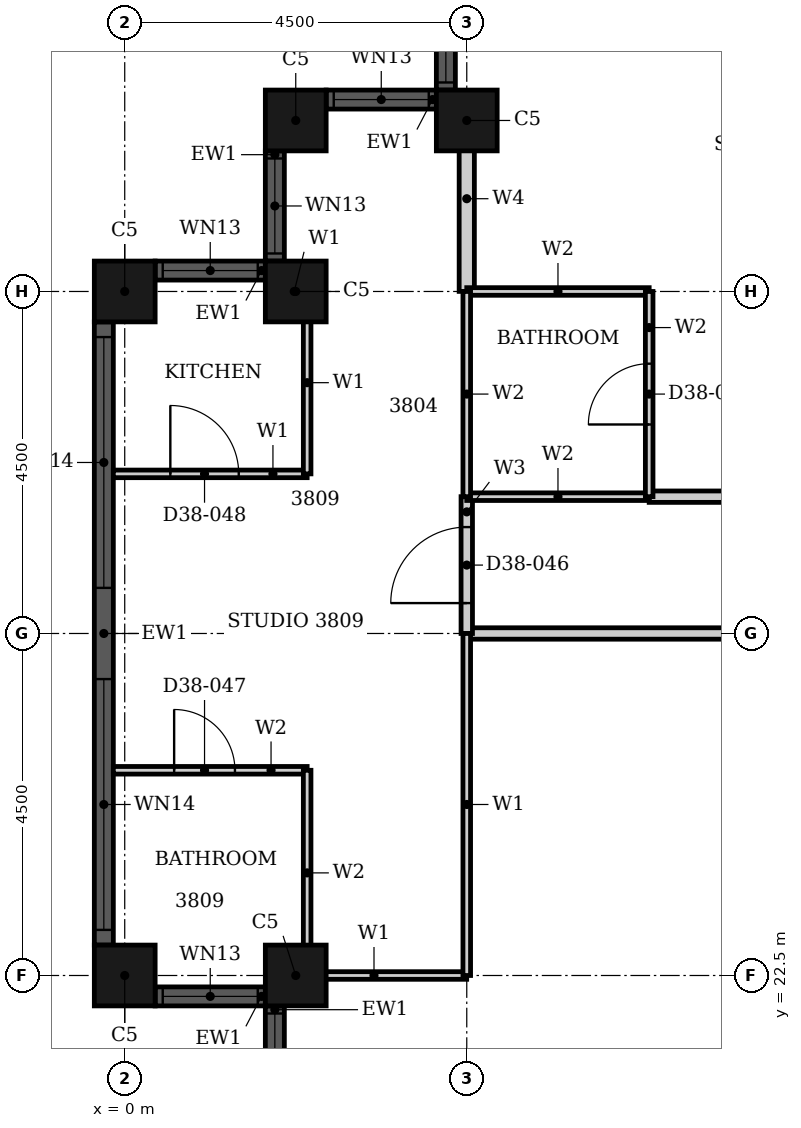
"""IFC4 building model, lengths in metres.
Left out: names, types, materials, properties, quantities, classifications, styles, units other than length and angle.
Written with IfcOpenShell. Run it as: python <this file> out.ifc"""

import sys

from ifc_helpers import new_model, si_unit, direction, frame, frame_2d, origin, origin_2d, place, context, subcontext, project, spatial, rectangle, hollow_rectangle, extrude, element, fill, save


model = new_model("IFC4")
c1 = context("Model", 3, precision=1e-05, world=origin(), true_north=direction((0.0, 1.0)))
c2 = subcontext(c1, "Body", "Model", "MODEL_VIEW")
j1 = project(units=[si_unit("LENGTHUNIT", "METRE"), si_unit("PLANEANGLEUNIT", "RADIAN")], contexts=[c1])
p1 = place(None, origin())
s1 = spatial("IfcSite", under=j1, at=p1, CompositionType="ELEMENT")
p2 = place(p1, origin())
s2 = spatial("IfcBuilding", under=s1, at=p2, CompositionType="ELEMENT")
p3 = place(p2, frame((0.0, 0.0, 154.3)))
s3 = spatial("IfcBuildingStorey", under=s2, at=p3, CompositionType="ELEMENT", Elevation=154.3)
for number, where, z_axis, x_axis in (
    (1, (4.5, 33.75, 0.0), (0.0, 0.0, 1.0), (1.0, 0.0, 0.0)),
    (2, (2.25, 33.75, 0.0), (0.0, 0.0, 1.0), (1.0, 0.0, 0.0)),
    (3, (2.25, 31.5, 0.0), (0.0, 0.0, 1.0), (1.0, 0.0, 0.0)),
    (4, (0.0, 31.5, 0.0), (0.0, 0.0, 1.0), (1.0, 0.0, 0.0)),
    (5, (0.0, 22.5, 0.0), (0.0, 0.0, 1.0), (1.0, 0.0, 0.0)),
    (6, (2.25, 22.5, 0.0), (0.0, 0.0, 1.0), (1.0, 0.0, 0.0)),
):
    element("IfcColumn", number, at=place(p3, frame(where, z_axis=z_axis, x_axis=x_axis)), inside=s3, PredefinedType="COLUMN", context=c2, shape_type="SweptSolid", body=[
        extrude(hollow_rectangle(XDim=0.8, YDim=0.8, WallThickness=0.025, at=origin_2d()), origin(), (0.0, 0.0, 1.0), 3.7),
    ])
p4 = place(p3, frame((4.225, 35.6, 0.0), z_axis=(0.0, 0.0, 1.0), x_axis=(0.0, -1.0, 0.0)))
e7 = element("IfcWall", 7, at=p4, inside=s3, PredefinedType="SOLIDWALL", context=c2, shape_type="SweptSolid", body=[
    extrude(rectangle(XDim=1.45, YDim=0.25, at=frame_2d((0.725, 0.0))), origin(), (0.0, 0.0, 1.0), 3.7),
])
p5 = place(p4, frame((0.1, 0.0, 0.9)))
e8 = element("IfcOpeningElement", 8, at=p5, cuts=e7, PredefinedType="OPENING", context=c2, shape_type="SweptSolid", body=[
    extrude(rectangle(XDim=1.25, YDim=2.08, at=frame_2d((0.625, 1.04))), frame((0.0, 0.135, 0.0), z_axis=(0.0, -1.0, 0.0), x_axis=(1.0, 0.0, 0.0)), (0.0, 0.0, 1.0), 0.27),
])
p6 = place(p3, frame((4.1, 34.025, 0.0), z_axis=(0.0, 0.0, 1.0), x_axis=(-1.0, 0.0, 0.0)))
e9 = element("IfcWall", 9, at=p6, inside=s3, PredefinedType="SOLIDWALL", context=c2, shape_type="SweptSolid", body=[
    extrude(rectangle(XDim=1.45, YDim=0.25, at=frame_2d((0.725, 0.0))), origin(), (0.0, 0.0, 1.0), 3.7),
])
p7 = place(p6, frame((0.1, 0.0, 0.9)))
e10 = element("IfcOpeningElement", 10, at=p7, cuts=e9, PredefinedType="OPENING", context=c2, shape_type="SweptSolid", body=[
    extrude(rectangle(XDim=1.25, YDim=1.85, at=frame_2d((0.625, 0.925))), frame((0.0, 0.135, 0.0), z_axis=(0.0, -1.0, 0.0), x_axis=(1.0, 0.0, 0.0)), (0.0, 0.0, 1.0), 0.27),
])
p8 = place(p3, frame((1.975, 33.35, 0.0), z_axis=(0.0, 0.0, 1.0), x_axis=(0.0, -1.0, 0.0)))
e11 = element("IfcWall", 11, at=p8, inside=s3, PredefinedType="SOLIDWALL", context=c2, shape_type="SweptSolid", body=[
    extrude(rectangle(XDim=1.45, YDim=0.25, at=frame_2d((0.725, 0.0))), origin(), (0.0, 0.0, 1.0), 3.7),
])
p9 = place(p8, frame((0.1, 0.0, 0.9)))
e12 = element("IfcOpeningElement", 12, at=p9, cuts=e11, PredefinedType="OPENING", context=c2, shape_type="SweptSolid", body=[
    extrude(rectangle(XDim=1.25, YDim=1.85, at=frame_2d((0.625, 0.925))), frame((0.0, 0.135, 0.0), z_axis=(0.0, -1.0, 0.0), x_axis=(1.0, 0.0, 0.0)), (0.0, 0.0, 1.0), 0.27),
])
p10 = place(p3, frame((1.85, 31.775, 0.0), z_axis=(0.0, 0.0, 1.0), x_axis=(-1.0, 0.0, 0.0)))
e13 = element("IfcWall", 13, at=p10, inside=s3, PredefinedType="SOLIDWALL", context=c2, shape_type="SweptSolid", body=[
    extrude(rectangle(XDim=1.45, YDim=0.25, at=frame_2d((0.725, 0.0))), origin(), (0.0, 0.0, 1.0), 3.7),
])
p11 = place(p10, frame((0.1, 0.0, 0.9)))
e14 = element("IfcOpeningElement", 14, at=p11, cuts=e13, PredefinedType="OPENING", context=c2, shape_type="SweptSolid", body=[
    extrude(rectangle(XDim=1.25, YDim=1.85, at=frame_2d((0.625, 0.925))), frame((0.0, 0.135, 0.0), z_axis=(0.0, -1.0, 0.0), x_axis=(1.0, 0.0, 0.0)), (0.0, 0.0, 1.0), 0.27),
])
p12 = place(p3, frame((-0.275, 31.1, 0.0), z_axis=(0.0, 0.0, 1.0), x_axis=(0.0, -1.0, 0.0)))
e15 = element("IfcWall", 15, at=p12, inside=s3, PredefinedType="SOLIDWALL", context=c2, shape_type="SweptSolid", body=[
    extrude(rectangle(XDim=8.2, YDim=0.25, at=frame_2d((4.1, 0.0))), origin(), (0.0, 0.0, 1.0), 3.7),
])
p13 = place(p12, frame((0.2, 0.0, 0.45)))
e16 = element("IfcOpeningElement", 16, at=p13, cuts=e15, PredefinedType="OPENING", context=c2, shape_type="SweptSolid", body=[
    extrude(rectangle(XDim=3.3, YDim=2.53, at=frame_2d((1.65, 1.265))), frame((0.0, 0.135, 0.0), z_axis=(0.0, -1.0, 0.0), x_axis=(1.0, 0.0, 0.0)), (0.0, 0.0, 1.0), 0.27),
])
p14 = place(p12, frame((4.7, 0.0, 0.45)))
e17 = element("IfcOpeningElement", 17, at=p14, cuts=e15, PredefinedType="OPENING", context=c2, shape_type="SweptSolid", body=[
    extrude(rectangle(XDim=3.3, YDim=2.53, at=frame_2d((1.65, 1.265))), frame((0.0, 0.135, 0.0), z_axis=(0.0, -1.0, 0.0), x_axis=(1.0, 0.0, 0.0)), (0.0, 0.0, 1.0), 0.27),
])
p15 = place(p3, frame((0.4, 22.225, 0.0), z_axis=(0.0, 0.0, 1.0), x_axis=(1.0, 0.0, 0.0)))
e18 = element("IfcWall", 18, at=p15, inside=s3, PredefinedType="SOLIDWALL", context=c2, shape_type="SweptSolid", body=[
    extrude(rectangle(XDim=1.45, YDim=0.25, at=frame_2d((0.725, 0.0))), origin(), (0.0, 0.0, 1.0), 3.7),
])
p16 = place(p15, frame((0.1, 0.0, 0.9)))
e19 = element("IfcOpeningElement", 19, at=p16, cuts=e18, PredefinedType="OPENING", context=c2, shape_type="SweptSolid", body=[
    extrude(rectangle(XDim=1.25, YDim=1.85, at=frame_2d((0.625, 0.925))), frame((0.0, 0.135, 0.0), z_axis=(0.0, -1.0, 0.0), x_axis=(1.0, 0.0, 0.0)), (0.0, 0.0, 1.0), 0.27),
])
p17 = place(p3, frame((1.975, 22.1, 0.0), z_axis=(0.0, 0.0, 1.0), x_axis=(0.0, -1.0, 0.0)))
e20 = element("IfcWall", 20, at=p17, inside=s3, PredefinedType="SOLIDWALL", context=c2, shape_type="SweptSolid", body=[
    extrude(rectangle(XDim=1.45, YDim=0.25, at=frame_2d((0.725, 0.0))), origin(), (0.0, 0.0, 1.0), 3.7),
])
p18 = place(p17, frame((0.1, 0.0, 0.9)))
e21 = element("IfcOpeningElement", 21, at=p18, cuts=e20, PredefinedType="OPENING", context=c2, shape_type="SweptSolid", body=[
    extrude(rectangle(XDim=1.25, YDim=1.85, at=frame_2d((0.625, 0.925))), frame((0.0, 0.135, 0.0), z_axis=(0.0, -1.0, 0.0), x_axis=(1.0, 0.0, 0.0)), (0.0, 0.0, 1.0), 0.27),
])
p19 = place(p3, frame((4.5, 27.0, 0.0), z_axis=(0.0, 0.0, 1.0), x_axis=(1.0, 0.0, 0.0)))
e22 = element("IfcWall", 22, at=p19, inside=s3, PredefinedType="PARTITIONING", context=c2, shape_type="SweptSolid", body=[
    extrude(rectangle(XDim=13.5, YDim=0.15, at=frame_2d((6.75, 0.0))), origin(), (0.0, 0.0, 1.0), 2.68),
])
p20 = place(p19, frame((5.35, 0.0, 0.0)))
e23 = element("IfcOpeningElement", 23, at=p20, cuts=e22, PredefinedType="OPENING", context=c2, shape_type="SweptSolid", body=[
    extrude(rectangle(XDim=1.0, YDim=2.1, at=frame_2d((0.5, 1.05))), frame((0.0, 0.085, 0.0), z_axis=(0.0, -1.0, 0.0), x_axis=(1.0, 0.0, 0.0)), (0.0, 0.0, 1.0), 0.17),
])
p21 = place(p3, frame((6.9, 28.8, 0.0), z_axis=(0.0, 0.0, 1.0), x_axis=(1.0, 0.0, 0.0)))
e24 = element("IfcWall", 24, at=p21, inside=s3, PredefinedType="PARTITIONING", context=c2, shape_type="SweptSolid", body=[
    extrude(rectangle(XDim=9.299, YDim=0.15, at=frame_2d((4.649, 0.0))), origin(), (0.0, 0.0, 1.0), 3.4),
])
p22 = place(p3, frame((4.5, 27.0, 0.0), z_axis=(0.0, 0.0, 1.0), x_axis=(0.0, 1.0, 0.0)))
e25 = element("IfcWall", 25, at=p22, inside=s3, PredefinedType="PARTITIONING", context=c2, shape_type="SweptSolid", body=[
    extrude(rectangle(XDim=1.8, YDim=0.15, at=frame_2d((0.9, 0.0))), origin(), (0.0, 0.0, 1.0), 3.4),
])
p23 = place(p22, frame((0.4, 0.0, 0.0)))
e26 = element("IfcOpeningElement", 26, at=p23, cuts=e25, PredefinedType="OPENING", context=c2, shape_type="SweptSolid", body=[
    extrude(rectangle(XDim=1.0, YDim=2.2, at=frame_2d((0.5, 1.1))), frame((0.0, 0.085, 0.0), z_axis=(0.0, -1.0, 0.0), x_axis=(1.0, 0.0, 0.0)), (0.0, 0.0, 1.0), 0.17),
])
p24 = place(p3, frame((2.06, 22.5, 0.0), z_axis=(0.0, 0.0, 1.0), x_axis=(1.0, 0.0, 0.0)))
e27 = element("IfcWall", 27, at=p24, inside=s3, PredefinedType="PARTITIONING", context=c2, shape_type="SweptSolid", body=[
    extrude(rectangle(XDim=2.439, YDim=0.1, at=frame_2d((1.219, 0.0))), origin(), (0.0, 0.0, 1.0), 2.68),
])
p25 = place(p3, frame((-0.15, 29.1, 0.0), z_axis=(0.0, 0.0, 1.0), x_axis=(1.0, 0.0, 0.0)))
e28 = element("IfcWall", 28, at=p25, inside=s3, PredefinedType="PARTITIONING", context=c2, shape_type="SweptSolid", body=[
    extrude(rectangle(XDim=2.55, YDim=0.1, at=frame_2d((1.275, 0.0))), origin(), (0.0, 0.0, 1.0), 3.4),
])
p26 = place(p25, frame((0.75, 0.0, 0.0)))
e29 = element("IfcOpeningElement", 29, at=p26, cuts=e28, PredefinedType="OPENING", context=c2, shape_type="SweptSolid", body=[
    extrude(rectangle(XDim=0.9, YDim=2.1, at=frame_2d((0.45, 1.05))), frame((0.0, 0.06, 0.0), z_axis=(0.0, -1.0, 0.0), x_axis=(1.0, 0.0, 0.0)), (0.0, 0.0, 1.0), 0.12),
])
p27 = place(p3, frame((2.06, 31.5, 0.0), z_axis=(0.0, 0.0, 1.0), x_axis=(1.0, 0.0, 0.0)))
e30 = element("IfcWall", 30, at=p27, inside=s3, PredefinedType="PARTITIONING", context=c2, shape_type="SweptSolid", body=[
    extrude(rectangle(XDim=0.34, YDim=0.1, at=frame_2d((0.17, 0.0))), origin(), (0.0, 0.0, 1.0), 3.4),
])
p28 = place(p3, frame((2.4, 29.1, 0.0), z_axis=(0.0, 0.0, 1.0), x_axis=(0.0, 1.0, 0.0)))
e31 = element("IfcWall", 31, at=p28, inside=s3, PredefinedType="PARTITIONING", context=c2, shape_type="SweptSolid", body=[
    extrude(rectangle(XDim=2.4, YDim=0.1, at=frame_2d((1.2, 0.0))), origin(), (0.0, 0.0, 1.0), 3.4),
])
p29 = place(p3, frame((4.5, 22.5, 0.0), z_axis=(0.0, 0.0, 1.0), x_axis=(0.0, 1.0, 0.0)))
e32 = element("IfcWall", 32, at=p29, inside=s3, PredefinedType="PARTITIONING", context=c2, shape_type="SweptSolid", body=[
    extrude(rectangle(XDim=4.5, YDim=0.1, at=frame_2d((2.25, 0.0))), origin(), (0.0, 0.0, 1.0), 3.4),
])
p30 = place(p3, frame((4.5, 31.501, 0.0), z_axis=(0.0, 0.0, 1.0), x_axis=(0.0, 1.0, 0.0)))
e33 = element("IfcWall", 33, at=p30, inside=s3, PredefinedType="PARTITIONING", context=c2, shape_type="SweptSolid", body=[
    extrude(rectangle(XDim=2.439, YDim=0.2, at=frame_2d((1.219, 0.0))), origin(), (0.0, 0.0, 1.0), 3.4),
])
p31 = place(p3, frame((-0.15, 25.2, 0.0), z_axis=(0.0, 0.0, 1.0), x_axis=(1.0, 0.0, 0.0)))
e34 = element("IfcWall", 34, at=p31, inside=s3, PredefinedType="PARTITIONING", context=c2, shape_type="SweptSolid", body=[
    extrude(rectangle(XDim=2.55, YDim=0.1, at=frame_2d((1.275, 0.0))), origin(), (0.0, 0.0, 1.0), 3.4),
])
p32 = place(p31, frame((0.8, 0.0, 0.0)))
e35 = element("IfcOpeningElement", 35, at=p32, cuts=e34, PredefinedType="OPENING", context=c2, shape_type="SweptSolid", body=[
    extrude(rectangle(XDim=0.8, YDim=2.1, at=frame_2d((0.4, 1.05))), frame((0.0, 0.06, 0.0), z_axis=(0.0, -1.0, 0.0), x_axis=(1.0, 0.0, 0.0)), (0.0, 0.0, 1.0), 0.12),
])
p33 = place(p3, frame((4.5, 28.8, 0.0), z_axis=(0.0, 0.0, 1.0), x_axis=(1.0, 0.0, 0.0)))
e36 = element("IfcWall", 36, at=p33, inside=s3, PredefinedType="PARTITIONING", context=c2, shape_type="SweptSolid", body=[
    extrude(rectangle(XDim=2.4, YDim=0.1, at=frame_2d((1.2, 0.0))), origin(), (0.0, 0.0, 1.0), 3.4),
])
p34 = place(p3, frame((4.5, 31.5, 0.0), z_axis=(0.0, 0.0, 1.0), x_axis=(1.0, 0.0, 0.0)))
e37 = element("IfcWall", 37, at=p34, inside=s3, PredefinedType="PARTITIONING", context=c2, shape_type="SweptSolid", body=[
    extrude(rectangle(XDim=2.4, YDim=0.1, at=frame_2d((1.2, 0.0))), origin(), (0.0, 0.0, 1.0), 2.68),
])
for number, where, z_axis, x_axis in (
    (38, (2.4, 22.5, 0.0), (0.0, 0.0, 1.0), (0.0, 1.0, 0.0)),
    (39, (4.5, 28.8, 0.0), (0.0, 0.0, 1.0), (0.0, 1.0, 0.0)),
):
    element("IfcWall", number, at=place(p3, frame(where, z_axis=z_axis, x_axis=x_axis)), inside=s3, PredefinedType="PARTITIONING", context=c2, shape_type="SweptSolid", body=[
        extrude(rectangle(XDim=2.7, YDim=0.1, at=frame_2d((1.35, 0.0))), origin(), (0.0, 0.0, 1.0), 3.4),
    ])
p35 = place(p3, frame((6.9, 28.8, 0.0), z_axis=(0.0, 0.0, 1.0), x_axis=(0.0, 1.0, 0.0)))
e40 = element("IfcWall", 40, at=p35, inside=s3, PredefinedType="PARTITIONING", context=c2, shape_type="SweptSolid", body=[
    extrude(rectangle(XDim=2.7, YDim=0.1, at=frame_2d((1.35, 0.0))), origin(), (0.0, 0.0, 1.0), 3.4),
])
p36 = place(p35, frame((0.95, 0.0, 0.0)))
e41 = element("IfcOpeningElement", 41, at=p36, cuts=e40, PredefinedType="OPENING", context=c2, shape_type="SweptSolid", body=[
    extrude(rectangle(XDim=0.8, YDim=2.1, at=frame_2d((0.4, 1.05))), frame((0.0, 0.06, 0.0), z_axis=(0.0, -1.0, 0.0), x_axis=(1.0, 0.0, 0.0)), (0.0, 0.0, 1.0), 0.12),
])
p37 = place(p5, origin())
e42 = element("IfcWindow", 42, at=p37, inside=s3, PartitioningType="SINGLE_PANEL", PredefinedType="WINDOW", context=c2, shape_type="SweptSolid", body=[
    extrude(rectangle(XDim=1.25, YDim=2.08, at=frame_2d((0.625, 1.04))), frame((0.0, 0.03, 0.0), z_axis=(0.0, -1.0, 0.0), x_axis=(1.0, 0.0, 0.0)), (0.0, 0.0, 1.0), 0.06),
])
fill(e8, e42)
p38 = place(p7, origin())
e43 = element("IfcWindow", 43, at=p38, inside=s3, PartitioningType="SINGLE_PANEL", PredefinedType="WINDOW", context=c2, shape_type="SweptSolid", body=[
    extrude(rectangle(XDim=1.25, YDim=1.85, at=frame_2d((0.625, 0.925))), frame((0.0, 0.03, 0.0), z_axis=(0.0, -1.0, 0.0), x_axis=(1.0, 0.0, 0.0)), (0.0, 0.0, 1.0), 0.06),
])
fill(e10, e43)
p39 = place(p9, origin())
e44 = element("IfcWindow", 44, at=p39, inside=s3, PartitioningType="SINGLE_PANEL", PredefinedType="WINDOW", context=c2, shape_type="SweptSolid", body=[
    extrude(rectangle(XDim=1.25, YDim=1.85, at=frame_2d((0.625, 0.925))), frame((0.0, 0.03, 0.0), z_axis=(0.0, -1.0, 0.0), x_axis=(1.0, 0.0, 0.0)), (0.0, 0.0, 1.0), 0.06),
])
fill(e12, e44)
p40 = place(p11, origin())
e45 = element("IfcWindow", 45, at=p40, inside=s3, PartitioningType="SINGLE_PANEL", PredefinedType="WINDOW", context=c2, shape_type="SweptSolid", body=[
    extrude(rectangle(XDim=1.25, YDim=1.85, at=frame_2d((0.625, 0.925))), frame((0.0, 0.03, 0.0), z_axis=(0.0, -1.0, 0.0), x_axis=(1.0, 0.0, 0.0)), (0.0, 0.0, 1.0), 0.06),
])
fill(e14, e45)
p41 = place(p13, origin())
e46 = element("IfcWindow", 46, at=p41, inside=s3, PartitioningType="SINGLE_PANEL", PredefinedType="WINDOW", context=c2, shape_type="SweptSolid", body=[
    extrude(rectangle(XDim=3.3, YDim=2.53, at=frame_2d((1.65, 1.265))), frame((0.0, 0.03, 0.0), z_axis=(0.0, -1.0, 0.0), x_axis=(1.0, 0.0, 0.0)), (0.0, 0.0, 1.0), 0.06),
])
fill(e16, e46)
p42 = place(p14, origin())
e47 = element("IfcWindow", 47, at=p42, inside=s3, PartitioningType="SINGLE_PANEL", PredefinedType="WINDOW", context=c2, shape_type="SweptSolid", body=[
    extrude(rectangle(XDim=3.3, YDim=2.53, at=frame_2d((1.65, 1.265))), frame((0.0, 0.03, 0.0), z_axis=(0.0, -1.0, 0.0), x_axis=(1.0, 0.0, 0.0)), (0.0, 0.0, 1.0), 0.06),
])
fill(e17, e47)
p43 = place(p16, origin())
e48 = element("IfcWindow", 48, at=p43, inside=s3, PartitioningType="SINGLE_PANEL", PredefinedType="WINDOW", context=c2, shape_type="SweptSolid", body=[
    extrude(rectangle(XDim=1.25, YDim=1.85, at=frame_2d((0.625, 0.925))), frame((0.0, 0.03, 0.0), z_axis=(0.0, -1.0, 0.0), x_axis=(1.0, 0.0, 0.0)), (0.0, 0.0, 1.0), 0.06),
])
fill(e19, e48)
p44 = place(p18, origin())
e49 = element("IfcWindow", 49, at=p44, inside=s3, PartitioningType="SINGLE_PANEL", PredefinedType="WINDOW", context=c2, shape_type="SweptSolid", body=[
    extrude(rectangle(XDim=1.25, YDim=1.85, at=frame_2d((0.625, 0.925))), frame((0.0, 0.03, 0.0), z_axis=(0.0, -1.0, 0.0), x_axis=(1.0, 0.0, 0.0)), (0.0, 0.0, 1.0), 0.06),
])
fill(e21, e49)
p45 = place(p36, origin())
e50 = element("IfcDoor", 50, at=p45, inside=s3, OperationType="SINGLE_SWING_LEFT", PredefinedType="DOOR", context=c2, shape_type="SweptSolid", body=[
    extrude(rectangle(XDim=0.8, YDim=2.1, at=frame_2d((0.4, 1.05))), frame((0.0, 0.025, 0.0), z_axis=(0.0, -1.0, 0.0), x_axis=(1.0, 0.0, 0.0)), (0.0, 0.0, 1.0), 0.05),
])
fill(e41, e50)
p46 = place(p23, origin())
e51 = element("IfcDoor", 51, at=p46, inside=s3, OperationType="SINGLE_SWING_LEFT", PredefinedType="DOOR", context=c2, shape_type="SweptSolid", body=[
    extrude(rectangle(XDim=1.0, YDim=2.2, at=frame_2d((0.5, 1.1))), frame((0.0, 0.025, 0.0), z_axis=(0.0, -1.0, 0.0), x_axis=(1.0, 0.0, 0.0)), (0.0, 0.0, 1.0), 0.05),
])
fill(e26, e51)
p47 = place(p32, origin())
e52 = element("IfcDoor", 52, at=p47, inside=s3, OperationType="SINGLE_SWING_LEFT", PredefinedType="DOOR", context=c2, shape_type="SweptSolid", body=[
    extrude(rectangle(XDim=0.8, YDim=2.1, at=frame_2d((0.4, 1.05))), frame((0.0, 0.025, 0.0), z_axis=(0.0, -1.0, 0.0), x_axis=(1.0, 0.0, 0.0)), (0.0, 0.0, 1.0), 0.05),
])
fill(e35, e52)
p48 = place(p26, origin())
e53 = element("IfcDoor", 53, at=p48, inside=s3, OperationType="SINGLE_SWING_LEFT", PredefinedType="DOOR", context=c2, shape_type="SweptSolid", body=[
    extrude(rectangle(XDim=0.9, YDim=2.1, at=frame_2d((0.45, 1.05))), frame((0.0, 0.025, 0.0), z_axis=(0.0, -1.0, 0.0), x_axis=(1.0, 0.0, 0.0)), (0.0, 0.0, 1.0), 0.05),
])
fill(e29, e53)
save(model, sys.argv[1])
